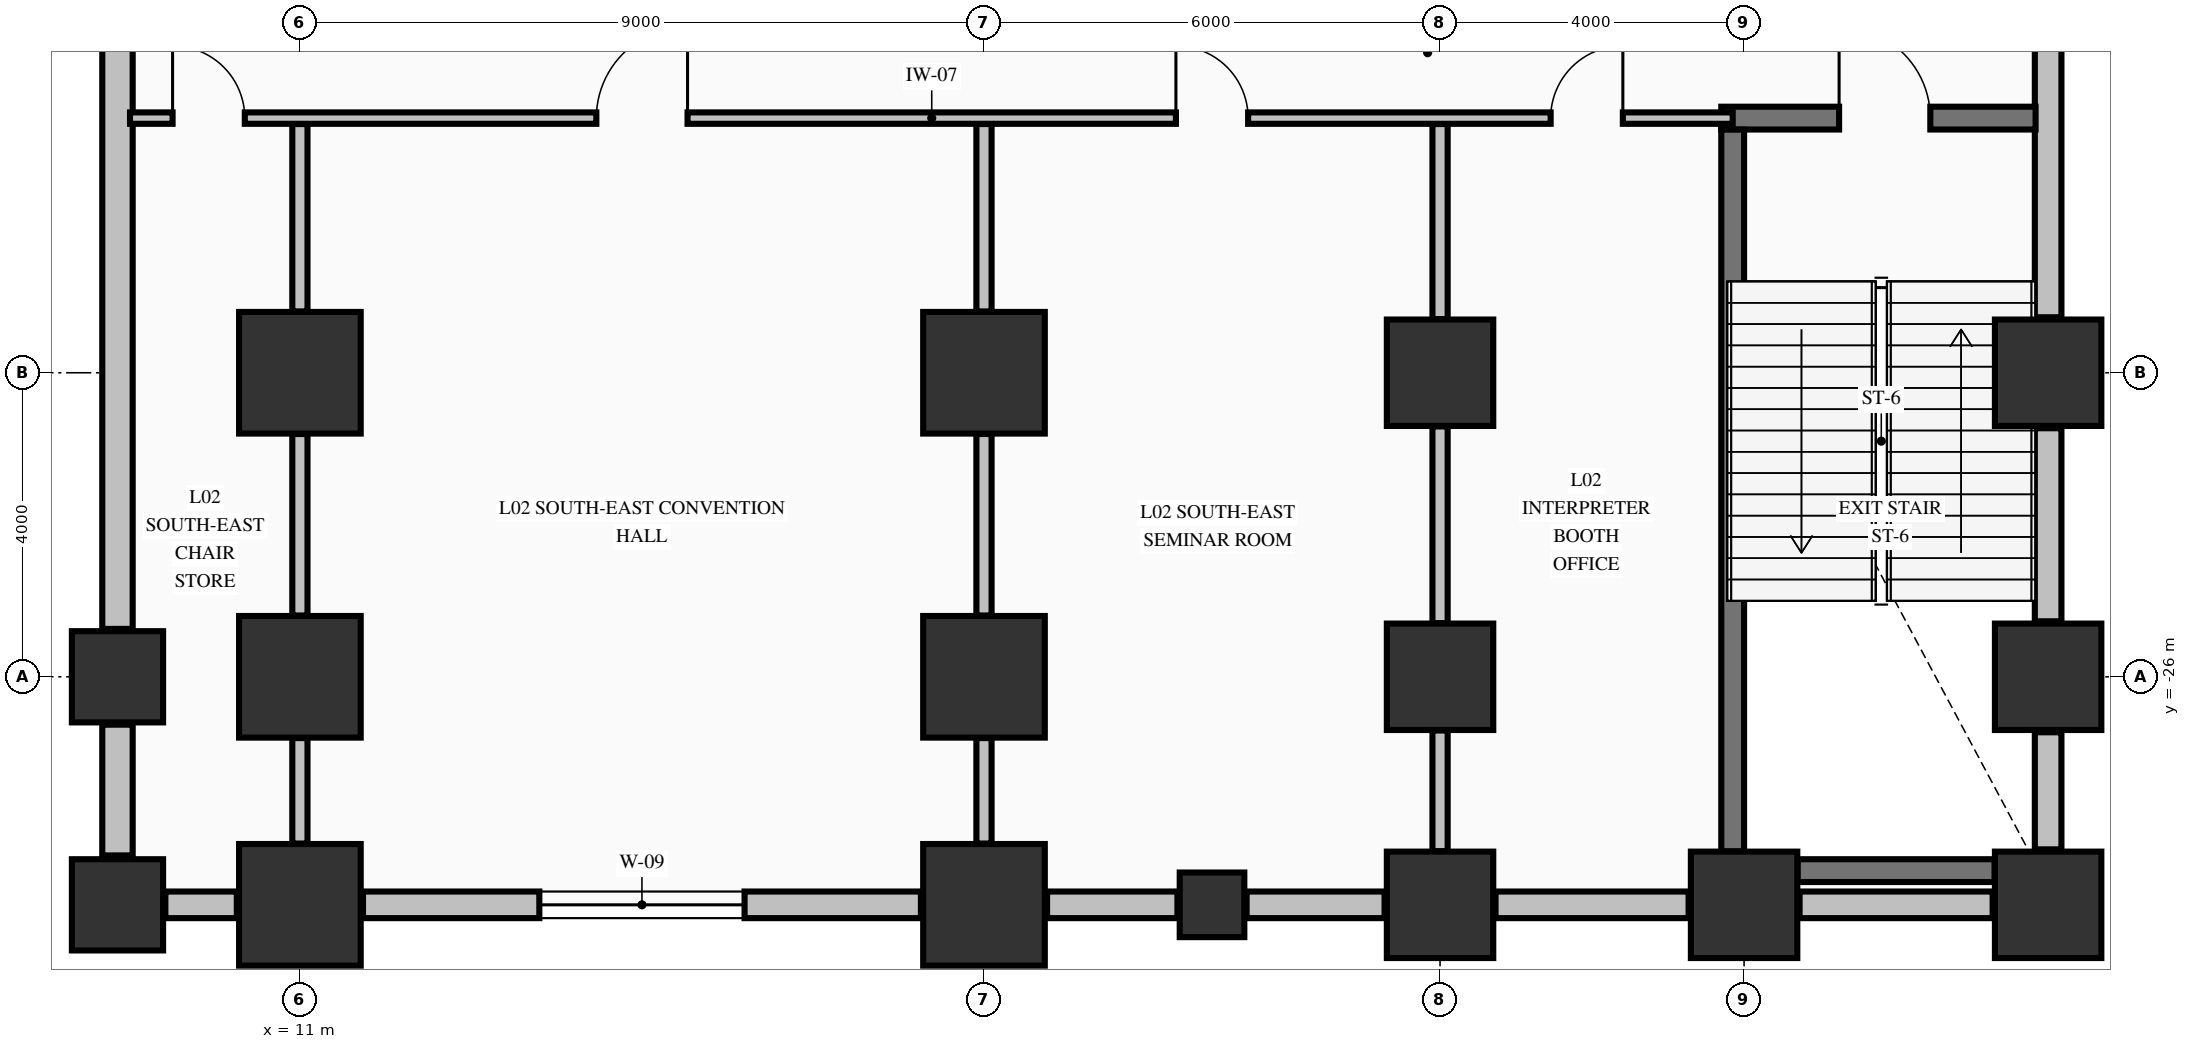
"""IFC4 building model, lengths in metres.
Left out: names, types, materials, properties, quantities, classifications, styles, units other than length and angle.
Written with IfcOpenShell. Run it as: python <this file> out.ifc"""

import sys

from ifc_helpers import new_model, si_unit, direction, frame, frame_2d, origin, origin_2d, place, context, subcontext, project, spatial, rectangle, extrude, element, fill, save


model = new_model("IFC4")
c1 = context("Model", 3, precision=1e-05, world=origin(), true_north=direction((0.0, 1.0)))
c2 = subcontext(c1, "Body", "Model", "MODEL_VIEW")
j1 = project(units=[si_unit("LENGTHUNIT", "METRE"), si_unit("PLANEANGLEUNIT", "RADIAN")], contexts=[c1])
p1 = place(None, origin())
s1 = spatial("IfcSite", under=j1, at=p1, CompositionType="ELEMENT")
p2 = place(p1, origin())
s2 = spatial("IfcBuilding", under=s1, at=p2, CompositionType="ELEMENT")
p3 = place(p2, frame((0.0, 0.0, 10.88)))
s3 = spatial("IfcBuildingStorey", under=s2, at=p3, CompositionType="ELEMENT", Elevation=10.88)
for number, where, z_axis, x_axis in (
    (1, (11.0, -29.0, 0.0), (0.0, 0.0, 1.0), (1.0, 0.0, 0.0)),
    (2, (11.0, -26.0, 0.0), (0.0, 0.0, 1.0), (1.0, 0.0, 0.0)),
    (3, (11.0, -22.0, 0.0), (0.0, 0.0, 1.0), (1.0, 0.0, 0.0)),
    (4, (20.0, -29.0, 0.0), (0.0, 0.0, 1.0), (1.0, 0.0, 0.0)),
    (5, (20.0, -26.0, 0.0), (0.0, 0.0, 1.0), (1.0, 0.0, 0.0)),
    (6, (20.0, -22.0, 0.0), (0.0, 0.0, 1.0), (1.0, 0.0, 0.0)),
):
    element("IfcColumn", number, at=place(p3, frame(where, z_axis=z_axis, x_axis=x_axis)), inside=s3, PredefinedType="COLUMN", context=c2, shape_type="SweptSolid", body=[
        extrude(rectangle(XDim=1.6, YDim=1.6, at=origin_2d()), origin(), (0.0, 0.0, 1.0), 5.09),
    ])
for number, where, z_axis, x_axis in (
    (7, (26.0, -29.0, 0.0), (0.0, 0.0, 1.0), (1.0, 0.0, 0.0)),
    (8, (26.0, -26.0, 0.0), (0.0, 0.0, 1.0), (1.0, 0.0, 0.0)),
    (9, (26.0, -22.0, 0.0), (0.0, 0.0, 1.0), (1.0, 0.0, 0.0)),
    (10, (30.0, -29.0, 0.0), (0.0, 0.0, 1.0), (1.0, 0.0, 0.0)),
    (11, (34.0, -29.0, 0.0), (0.0, 0.0, 1.0), (1.0, 0.0, 0.0)),
    (12, (34.0, -26.0, 0.0), (0.0, 0.0, 1.0), (1.0, 0.0, 0.0)),
    (13, (34.0, -22.0, 0.0), (0.0, 0.0, 1.0), (1.0, 0.0, 0.0)),
):
    element("IfcColumn", number, at=place(p3, frame(where, z_axis=z_axis, x_axis=x_axis)), inside=s3, PredefinedType="COLUMN", context=c2, shape_type="SweptSolid", body=[
        extrude(rectangle(XDim=1.4, YDim=1.4, at=origin_2d()), origin(), (0.0, 0.0, 1.0), 5.09),
    ])
for number, where, z_axis, x_axis in (
    (14, (8.6, -29.0, 0.0), (0.0, 0.0, 1.0), (1.0, 0.0, 0.0)),
    (15, (8.6, -26.0, 0.0), (0.0, 0.0, 1.0), (1.0, 0.0, 0.0)),
):
    element("IfcColumn", number, at=place(p3, frame(where, z_axis=z_axis, x_axis=x_axis)), inside=s3, PredefinedType="COLUMN", context=c2, shape_type="SweptSolid", body=[
        extrude(rectangle(XDim=1.2, YDim=1.2, at=origin_2d()), origin(), (0.0, 0.0, 1.0), 5.09),
    ])
p4 = place(p3, frame((23.0, -29.0, 0.0), z_axis=(0.0, 0.0, 1.0), x_axis=(1.0, 0.0, 0.0)))
e16 = element("IfcColumn", 16, at=p4, inside=s3, PredefinedType="PILASTER", context=c2, shape_type="SweptSolid", body=[
    extrude(rectangle(XDim=0.85, YDim=0.85, at=origin_2d()), origin(), (0.0, 0.0, 1.0), 5.09),
])
p5 = place(p3, frame((9.23, -29.0, 0.0), z_axis=(0.0, 0.0, 1.0), x_axis=(1.0, 0.0, 0.0)))
e17 = element("IfcWall", 17, at=p5, inside=s3, PredefinedType="STANDARD", context=c2, shape_type="SweptSolid", body=[
    extrude(rectangle(XDim=0.94, YDim=0.35, at=frame_2d((0.47, 0.0))), origin(), (0.0, 0.0, 1.0), 4.482),
])
p6 = place(p3, frame((11.83, -29.0, 0.0), z_axis=(0.0, 0.0, 1.0), x_axis=(1.0, 0.0, 0.0)))
e18 = element("IfcWall", 18, at=p6, inside=s3, PredefinedType="STANDARD", context=c2, shape_type="SweptSolid", body=[
    extrude(rectangle(XDim=7.34, YDim=0.35, at=frame_2d((3.67, 0.0))), origin(), (0.0, 0.0, 1.0), 4.482),
])
p7 = place(p6, frame((2.32, 0.0, 0.85)))
e19 = element("IfcOpeningElement", 19, at=p7, cuts=e18, PredefinedType="OPENING", context=c2, shape_type="SweptSolid", body=[
    extrude(rectangle(XDim=2.7, YDim=2.05, at=frame_2d((1.35, 1.025))), frame((0.0, 0.185, 0.0), z_axis=(0.0, -1.0, 0.0), x_axis=(1.0, 0.0, 0.0)), (0.0, 0.0, 1.0), 0.37),
])
p8 = place(p3, frame((20.83, -29.0, 0.0), z_axis=(0.0, 0.0, 1.0), x_axis=(1.0, 0.0, 0.0)))
e20 = element("IfcWall", 20, at=p8, inside=s3, PredefinedType="STANDARD", context=c2, shape_type="SweptSolid", body=[
    extrude(rectangle(XDim=1.715, YDim=0.35, at=frame_2d((0.857, 0.0))), origin(), (0.0, 0.0, 1.0), 4.482),
])
p9 = place(p3, frame((23.455, -29.0, 0.0), z_axis=(0.0, 0.0, 1.0), x_axis=(1.0, 0.0, 0.0)))
e21 = element("IfcWall", 21, at=p9, inside=s3, PredefinedType="STANDARD", context=c2, shape_type="SweptSolid", body=[
    extrude(rectangle(XDim=1.815, YDim=0.35, at=frame_2d((0.907, 0.0))), origin(), (0.0, 0.0, 1.0), 4.482),
])
for number, where, z_axis, x_axis in (
    (22, (26.73, -29.0, 0.0), (0.0, 0.0, 1.0), (1.0, 0.0, 0.0)),
    (23, (30.73, -29.0, 0.0), (0.0, 0.0, 1.0), (1.0, 0.0, 0.0)),
):
    element("IfcWall", number, at=place(p3, frame(where, z_axis=z_axis, x_axis=x_axis)), inside=s3, PredefinedType="STANDARD", context=c2, shape_type="SweptSolid", body=[
        extrude(rectangle(XDim=2.54, YDim=0.35, at=frame_2d((1.27, 0.0))), origin(), (0.0, 0.0, 1.0), 4.482),
    ])
p10 = place(p3, frame((34.0, -26.73, 0.0), z_axis=(0.0, 0.0, 1.0), x_axis=(0.0, -1.0, 0.0)))
e24 = element("IfcWall", 24, at=p10, inside=s3, PredefinedType="STANDARD", context=c2, shape_type="SweptSolid", body=[
    extrude(rectangle(XDim=1.54, YDim=0.35, at=frame_2d((0.77, 0.0))), origin(), (0.0, 0.0, 1.0), 5.09),
])
p11 = place(p3, frame((34.0, -22.73, 0.0), z_axis=(0.0, 0.0, 1.0), x_axis=(0.0, -1.0, 0.0)))
e25 = element("IfcWall", 25, at=p11, inside=s3, PredefinedType="STANDARD", context=c2, shape_type="SweptSolid", body=[
    extrude(rectangle(XDim=2.54, YDim=0.35, at=frame_2d((1.27, 0.0))), origin(), (0.0, 0.0, 1.0), 5.09),
])
p12 = place(p3, frame((34.0, -16.73, 0.0), z_axis=(0.0, 0.0, 1.0), x_axis=(0.0, -1.0, 0.0)))
e26 = element("IfcWall", 26, at=p12, inside=s3, PredefinedType="STANDARD", context=c2, shape_type="SweptSolid", body=[
    extrude(rectangle(XDim=4.54, YDim=0.35, at=frame_2d((2.27, 0.0))), origin(), (0.0, 0.0, 1.0), 5.09),
])
p13 = place(p3, frame((8.6, -0.65, 0.0), z_axis=(0.0, 0.0, 1.0), x_axis=(0.0, -1.0, 0.0)))
e27 = element("IfcWall", 27, at=p13, inside=s3, PredefinedType="STANDARD", context=c2, shape_type="SweptSolid", body=[
    extrude(rectangle(XDim=24.72, YDim=0.4, at=frame_2d((12.36, 0.0))), origin(), (0.0, 0.0, 1.0), 4.132),
])
p14 = place(p3, frame((8.6, -26.63, 0.0), z_axis=(0.0, 0.0, 1.0), x_axis=(0.0, -1.0, 0.0)))
e28 = element("IfcWall", 28, at=p14, inside=s3, PredefinedType="STANDARD", context=c2, shape_type="SweptSolid", body=[
    extrude(rectangle(XDim=1.72, YDim=0.4, at=frame_2d((0.86, 0.0))), origin(), (0.0, 0.0, 1.0), 4.132),
])
p15 = place(p3, frame((30.704, -28.55, 0.0), z_axis=(0.0, 0.0, 1.0), x_axis=(1.0, 0.0, 0.0)))
e29 = element("IfcWall", 29, at=p15, inside=s3, PredefinedType="SHEAR", context=c2, shape_type="SweptSolid", body=[
    extrude(rectangle(XDim=2.592, YDim=0.3, at=frame_2d((1.296, 0.0))), origin(), (0.0, 0.0, 1.0), 5.09),
])
p16 = place(p3, frame((29.7, -18.65, 0.0), z_axis=(0.0, 0.0, 1.0), x_axis=(1.0, 0.0, 0.0)))
e30 = element("IfcWall", 30, at=p16, inside=s3, PredefinedType="SHEAR", context=c2, shape_type="SweptSolid", body=[
    extrude(rectangle(XDim=4.135, YDim=0.3, at=frame_2d((2.067, 0.0))), origin(), (0.0, 0.0, 1.0), 5.09),
])
p17 = place(p16, frame((1.55, 0.0, 0.0)))
e31 = element("IfcOpeningElement", 31, at=p17, cuts=e30, PredefinedType="OPENING", context=c2, shape_type="SweptSolid", body=[
    extrude(rectangle(XDim=1.2, YDim=2.15, at=frame_2d((0.6, 1.075))), frame((0.0, 0.16, 0.0), z_axis=(0.0, -1.0, 0.0), x_axis=(1.0, 0.0, 0.0)), (0.0, 0.0, 1.0), 0.32),
])
p18 = place(p3, frame((8.765, -18.65, 0.0), z_axis=(0.0, 0.0, 1.0), x_axis=(1.0, 0.0, 0.0)))
e32 = element("IfcWall", 32, at=p18, inside=s3, PredefinedType="PARTITIONING", context=c2, shape_type="SweptSolid", body=[
    extrude(rectangle(XDim=21.085, YDim=0.15, at=frame_2d((10.542, 0.0))), origin(), (0.0, 0.0, 1.0), 5.09),
])
p19 = place(p18, frame((0.56, 0.0, 0.0)))
e33 = element("IfcOpeningElement", 33, at=p19, cuts=e32, PredefinedType="OPENING", context=c2, shape_type="SweptSolid", body=[
    extrude(rectangle(XDim=0.95, YDim=2.15, at=frame_2d((0.475, 1.075))), frame((0.0, 0.085, 0.0), z_axis=(0.0, -1.0, 0.0), x_axis=(1.0, 0.0, 0.0)), (0.0, 0.0, 1.0), 0.17),
])
p20 = place(p18, frame((6.135, 0.0, 0.0)))
e34 = element("IfcOpeningElement", 34, at=p20, cuts=e32, PredefinedType="OPENING", context=c2, shape_type="SweptSolid", body=[
    extrude(rectangle(XDim=1.2, YDim=2.15, at=frame_2d((0.6, 1.075))), frame((0.0, 0.085, 0.0), z_axis=(0.0, -1.0, 0.0), x_axis=(1.0, 0.0, 0.0)), (0.0, 0.0, 1.0), 0.17),
])
p21 = place(p18, frame((13.76, 0.0, 0.0)))
e35 = element("IfcOpeningElement", 35, at=p21, cuts=e32, PredefinedType="OPENING", context=c2, shape_type="SweptSolid", body=[
    extrude(rectangle(XDim=0.95, YDim=2.15, at=frame_2d((0.475, 1.075))), frame((0.0, 0.085, 0.0), z_axis=(0.0, -1.0, 0.0), x_axis=(1.0, 0.0, 0.0)), (0.0, 0.0, 1.0), 0.17),
])
p22 = place(p18, frame((18.69, 0.0, 0.0)))
e36 = element("IfcOpeningElement", 36, at=p22, cuts=e32, PredefinedType="OPENING", context=c2, shape_type="SweptSolid", body=[
    extrude(rectangle(XDim=0.95, YDim=2.15, at=frame_2d((0.475, 1.075))), frame((0.0, 0.085, 0.0), z_axis=(0.0, -1.0, 0.0), x_axis=(1.0, 0.0, 0.0)), (0.0, 0.0, 1.0), 0.17),
])
p23 = place(p3, frame((29.85, -28.296, 0.0), z_axis=(0.0, 0.0, 1.0), x_axis=(0.0, 1.0, 0.0)))
e37 = element("IfcWall", 37, at=p23, inside=s3, PredefinedType="SHEAR", context=c2, shape_type="SweptSolid", body=[
    extrude(rectangle(XDim=9.494, YDim=0.3, at=frame_2d((4.747, 0.0))), origin(), (0.0, 0.0, 1.0), 5.09),
])
p24 = place(p3, frame((11.0, -28.194, 0.0), z_axis=(0.0, 0.0, 1.0), x_axis=(0.0, 1.0, 0.0)))
e38 = element("IfcWall", 38, at=p24, inside=s3, PredefinedType="PARTITIONING", context=c2, shape_type="SweptSolid", body=[
    extrude(rectangle(XDim=1.388, YDim=0.2, at=frame_2d((0.694, 0.0))), origin(), (0.0, 0.0, 1.0), 4.132),
])
p25 = place(p3, frame((11.0, -25.194, 0.0), z_axis=(0.0, 0.0, 1.0), x_axis=(0.0, 1.0, 0.0)))
e39 = element("IfcWall", 39, at=p25, inside=s3, PredefinedType="PARTITIONING", context=c2, shape_type="SweptSolid", body=[
    extrude(rectangle(XDim=2.388, YDim=0.2, at=frame_2d((1.194, 0.0))), origin(), (0.0, 0.0, 1.0), 4.132),
])
p26 = place(p3, frame((11.0, -21.194, 0.0), z_axis=(0.0, 0.0, 1.0), x_axis=(0.0, 1.0, 0.0)))
e40 = element("IfcWall", 40, at=p26, inside=s3, PredefinedType="PARTITIONING", context=c2, shape_type="SweptSolid", body=[
    extrude(rectangle(XDim=2.466, YDim=0.2, at=frame_2d((1.233, 0.0))), origin(), (0.0, 0.0, 1.0), 4.132),
])
p27 = place(p3, frame((20.0, -28.194, 0.0), z_axis=(0.0, 0.0, 1.0), x_axis=(0.0, 1.0, 0.0)))
e41 = element("IfcWall", 41, at=p27, inside=s3, PredefinedType="PARTITIONING", context=c2, shape_type="SweptSolid", body=[
    extrude(rectangle(XDim=1.388, YDim=0.2, at=frame_2d((0.694, 0.0))), origin(), (0.0, 0.0, 1.0), 4.132),
])
p28 = place(p3, frame((20.0, -25.194, 0.0), z_axis=(0.0, 0.0, 1.0), x_axis=(0.0, 1.0, 0.0)))
e42 = element("IfcWall", 42, at=p28, inside=s3, PredefinedType="PARTITIONING", context=c2, shape_type="SweptSolid", body=[
    extrude(rectangle(XDim=2.388, YDim=0.2, at=frame_2d((1.194, 0.0))), origin(), (0.0, 0.0, 1.0), 4.132),
])
p29 = place(p3, frame((20.0, -21.194, 0.0), z_axis=(0.0, 0.0, 1.0), x_axis=(0.0, 1.0, 0.0)))
e43 = element("IfcWall", 43, at=p29, inside=s3, PredefinedType="PARTITIONING", context=c2, shape_type="SweptSolid", body=[
    extrude(rectangle(XDim=2.466, YDim=0.2, at=frame_2d((1.233, 0.0))), origin(), (0.0, 0.0, 1.0), 4.132),
])
p30 = place(p3, frame((26.0, -28.294, 0.0), z_axis=(0.0, 0.0, 1.0), x_axis=(0.0, 1.0, 0.0)))
e44 = element("IfcWall", 44, at=p30, inside=s3, PredefinedType="PARTITIONING", context=c2, shape_type="SweptSolid", body=[
    extrude(rectangle(XDim=1.588, YDim=0.2, at=frame_2d((0.794, 0.0))), origin(), (0.0, 0.0, 1.0), 4.132),
])
p31 = place(p3, frame((26.0, -25.294, 0.0), z_axis=(0.0, 0.0, 1.0), x_axis=(0.0, 1.0, 0.0)))
e45 = element("IfcWall", 45, at=p31, inside=s3, PredefinedType="PARTITIONING", context=c2, shape_type="SweptSolid", body=[
    extrude(rectangle(XDim=2.588, YDim=0.2, at=frame_2d((1.294, 0.0))), origin(), (0.0, 0.0, 1.0), 4.132),
])
p32 = place(p3, frame((26.0, -21.294, 0.0), z_axis=(0.0, 0.0, 1.0), x_axis=(0.0, 1.0, 0.0)))
e46 = element("IfcWall", 46, at=p32, inside=s3, PredefinedType="PARTITIONING", context=c2, shape_type="SweptSolid", body=[
    extrude(rectangle(XDim=2.566, YDim=0.2, at=frame_2d((1.283, 0.0))), origin(), (0.0, 0.0, 1.0), 4.132),
])
p33 = place(p7, origin())
e47 = element("IfcWindow", 47, at=p33, inside=s3, PartitioningType="SINGLE_PANEL", PredefinedType="WINDOW", context=c2, shape_type="SweptSolid", body=[
    extrude(rectangle(XDim=2.7, YDim=2.05, at=frame_2d((1.35, 1.025))), frame((0.0, 0.03, 0.0), z_axis=(0.0, -1.0, 0.0), x_axis=(1.0, 0.0, 0.0)), (0.0, 0.0, 1.0), 0.06),
])
fill(e19, e47)
p34 = place(p17, origin())
e48 = element("IfcDoor", 48, at=p34, inside=s3, OperationType="SINGLE_SWING_LEFT", PredefinedType="DOOR", context=c2, shape_type="SweptSolid", body=[
    extrude(rectangle(XDim=1.2, YDim=2.15, at=frame_2d((0.6, 1.075))), frame((0.0, 0.025, 0.0), z_axis=(0.0, -1.0, 0.0), x_axis=(1.0, 0.0, 0.0)), (0.0, 0.0, 1.0), 0.05),
])
fill(e31, e48)
p35 = place(p19, origin())
e49 = element("IfcDoor", 49, at=p35, inside=s3, OperationType="SINGLE_SWING_LEFT", PredefinedType="DOOR", context=c2, shape_type="SweptSolid", body=[
    extrude(rectangle(XDim=0.95, YDim=2.15, at=frame_2d((0.475, 1.075))), frame((0.0, 0.025, 0.0), z_axis=(0.0, -1.0, 0.0), x_axis=(1.0, 0.0, 0.0)), (0.0, 0.0, 1.0), 0.05),
])
fill(e33, e49)
p36 = place(p20, origin())
e50 = element("IfcDoor", 50, at=p36, inside=s3, OperationType="SINGLE_SWING_RIGHT", PredefinedType="DOOR", context=c2, shape_type="SweptSolid", body=[
    extrude(rectangle(XDim=1.2, YDim=2.15, at=frame_2d((0.6, 1.075))), frame((0.0, 0.025, 0.0), z_axis=(0.0, -1.0, 0.0), x_axis=(1.0, 0.0, 0.0)), (0.0, 0.0, 1.0), 0.05),
])
fill(e34, e50)
p37 = place(p21, origin())
e51 = element("IfcDoor", 51, at=p37, inside=s3, OperationType="SINGLE_SWING_LEFT", PredefinedType="DOOR", context=c2, shape_type="SweptSolid", body=[
    extrude(rectangle(XDim=0.95, YDim=2.15, at=frame_2d((0.475, 1.075))), frame((0.0, 0.025, 0.0), z_axis=(0.0, -1.0, 0.0), x_axis=(1.0, 0.0, 0.0)), (0.0, 0.0, 1.0), 0.05),
])
fill(e35, e51)
p38 = place(p22, origin())
e52 = element("IfcDoor", 52, at=p38, inside=s3, OperationType="SINGLE_SWING_RIGHT", PredefinedType="DOOR", context=c2, shape_type="SweptSolid", body=[
    extrude(rectangle(XDim=0.95, YDim=2.15, at=frame_2d((0.475, 1.075))), frame((0.0, 0.025, 0.0), z_axis=(0.0, -1.0, 0.0), x_axis=(1.0, 0.0, 0.0)), (0.0, 0.0, 1.0), 0.05),
])
fill(e36, e52)
save(model, sys.argv[1])
